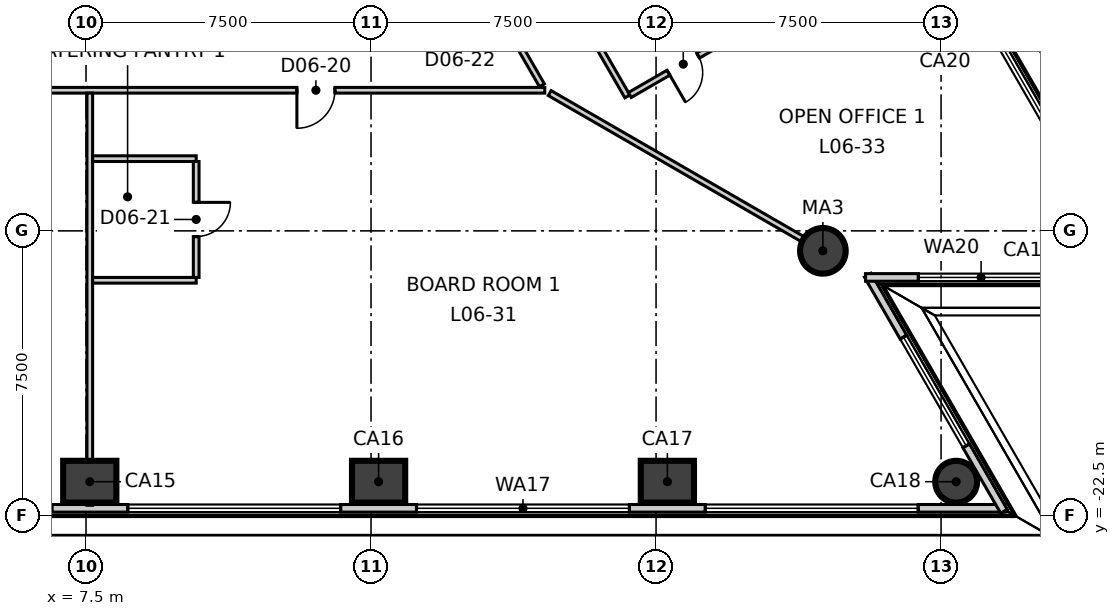
"""IFC4 building model, lengths in metres.
Left out: names, types, materials, properties, quantities, classifications, styles, units other than length and angle.
Written with IfcOpenShell. Run it as: python <this file> out.ifc"""

import sys

from ifc_helpers import new_model, si_unit, direction, frame, frame_2d, origin, origin_2d, place, context, subcontext, project, spatial, rectangle, circle, extrude, element, fill, save


model = new_model("IFC4")
c1 = context("Model", 3, precision=1e-05, world=origin(), true_north=direction((0.0, 1.0)))
c2 = subcontext(c1, "Body", "Model", "MODEL_VIEW")
j1 = project(units=[si_unit("LENGTHUNIT", "METRE"), si_unit("PLANEANGLEUNIT", "RADIAN")], contexts=[c1])
p1 = place(None, origin())
s1 = spatial("IfcSite", under=j1, at=p1, CompositionType="ELEMENT")
p2 = place(p1, origin())
s2 = spatial("IfcBuilding", under=s1, at=p2, CompositionType="ELEMENT")
p3 = place(p2, frame((0.0, 0.0, 35.3)))
s3 = spatial("IfcBuildingStorey", under=s2, at=p3, CompositionType="ELEMENT", Elevation=35.3)
for number, where, z_axis, x_axis in (
    (1, (7.599, -21.6, -0.3), (0.0, 0.0, 1.0), (1.0, 0.0, 0.0)),
    (2, (15.199, -21.6, -0.3), (0.0, 0.0, 1.0), (1.0, 0.0, 0.0)),
    (3, (22.798, -21.6, -0.3), (0.0, 0.0, 1.0), (1.0, 0.0, 0.0)),
):
    element("IfcColumn", number, at=place(p3, frame(where, z_axis=z_axis, x_axis=x_axis)), inside=s3, PredefinedType="COLUMN", context=c2, shape_type="SweptSolid", body=[
        extrude(rectangle(XDim=1.4, YDim=1.1, at=origin_2d()), origin(), (0.0, 0.0, 1.0), 4.0),
    ])
p4 = place(p3, frame((30.397, -21.6, -0.3), z_axis=(0.0, 0.0, 1.0), x_axis=(1.0, 0.0, 0.0)))
e4 = element("IfcColumn", 4, at=p4, inside=s3, PredefinedType="COLUMN", context=c2, shape_type="SweptSolid", body=[
    extrude(circle(Radius=0.55, at=origin_2d()), origin(), (0.0, 0.0, 1.0), 4.0),
])
p5 = place(p3, frame((26.89, -15.525, -0.3), z_axis=(0.0, 0.0, 1.0), x_axis=(1.0, 0.0, 0.0)))
e5 = element("IfcColumn", 5, at=p5, inside=s3, PredefinedType="COLUMN", context=c2, shape_type="SweptSolid", body=[
    extrude(circle(Radius=0.6, at=origin_2d()), origin(), (0.0, 0.0, 1.0), 4.0),
])
p6 = place(p3, frame((-31.7, -22.3, 0.0), z_axis=(0.0, 0.0, 1.0), x_axis=(1.0, 0.0, 0.0)))
e6 = element("IfcWall", 6, at=p6, inside=s3, PredefinedType="ELEMENTEDWALL", context=c2, shape_type="SweptSolid", body=[
    extrude(rectangle(XDim=63.38, YDim=0.2, at=frame_2d((31.69, 0.0))), origin(), (0.0, 0.0, 1.0), 3.7),
])
p7 = place(p6, frame((2.303, 0.0, 0.9)))
e7 = element("IfcOpeningElement", 7, at=p7, cuts=e6, PredefinedType="OPENING", context=c2, shape_type="SweptSolid", body=[
    extrude(rectangle(XDim=5.6, YDim=2.5, at=frame_2d((2.8, 1.25))), frame((0.0, 0.11, 0.0), z_axis=(0.0, -1.0, 0.0), x_axis=(1.0, 0.0, 0.0)), (0.0, 0.0, 1.0), 0.22),
])
p8 = place(p6, frame((9.902, 0.0, 0.9)))
e8 = element("IfcOpeningElement", 8, at=p8, cuts=e6, PredefinedType="OPENING", context=c2, shape_type="SweptSolid", body=[
    extrude(rectangle(XDim=5.6, YDim=2.5, at=frame_2d((2.8, 1.25))), frame((0.0, 0.11, 0.0), z_axis=(0.0, -1.0, 0.0), x_axis=(1.0, 0.0, 0.0)), (0.0, 0.0, 1.0), 0.22),
])
p9 = place(p6, frame((17.501, 0.0, 0.9)))
e9 = element("IfcOpeningElement", 9, at=p9, cuts=e6, PredefinedType="OPENING", context=c2, shape_type="SweptSolid", body=[
    extrude(rectangle(XDim=5.6, YDim=2.5, at=frame_2d((2.8, 1.25))), frame((0.0, 0.11, 0.0), z_axis=(0.0, -1.0, 0.0), x_axis=(1.0, 0.0, 0.0)), (0.0, 0.0, 1.0), 0.22),
])
p10 = place(p6, frame((25.1, 0.0, 0.9)))
e10 = element("IfcOpeningElement", 10, at=p10, cuts=e6, PredefinedType="OPENING", context=c2, shape_type="SweptSolid", body=[
    extrude(rectangle(XDim=5.6, YDim=2.5, at=frame_2d((2.8, 1.25))), frame((0.0, 0.11, 0.0), z_axis=(0.0, -1.0, 0.0), x_axis=(1.0, 0.0, 0.0)), (0.0, 0.0, 1.0), 0.22),
])
p11 = place(p6, frame((32.7, 0.0, 0.9)))
e11 = element("IfcOpeningElement", 11, at=p11, cuts=e6, PredefinedType="OPENING", context=c2, shape_type="SweptSolid", body=[
    extrude(rectangle(XDim=5.6, YDim=2.5, at=frame_2d((2.8, 1.25))), frame((0.0, 0.11, 0.0), z_axis=(0.0, -1.0, 0.0), x_axis=(1.0, 0.0, 0.0)), (0.0, 0.0, 1.0), 0.22),
])
p12 = place(p6, frame((40.299, 0.0, 0.9)))
e12 = element("IfcOpeningElement", 12, at=p12, cuts=e6, PredefinedType="OPENING", context=c2, shape_type="SweptSolid", body=[
    extrude(rectangle(XDim=5.6, YDim=2.5, at=frame_2d((2.8, 1.25))), frame((0.0, 0.11, 0.0), z_axis=(0.0, -1.0, 0.0), x_axis=(1.0, 0.0, 0.0)), (0.0, 0.0, 1.0), 0.22),
])
p13 = place(p6, frame((47.898, 0.0, 0.9)))
e13 = element("IfcOpeningElement", 13, at=p13, cuts=e6, PredefinedType="OPENING", context=c2, shape_type="SweptSolid", body=[
    extrude(rectangle(XDim=5.6, YDim=2.5, at=frame_2d((2.8, 1.25))), frame((0.0, 0.11, 0.0), z_axis=(0.0, -1.0, 0.0), x_axis=(1.0, 0.0, 0.0)), (0.0, 0.0, 1.0), 0.22),
])
p14 = place(p6, frame((55.497, 0.0, 0.9)))
e14 = element("IfcOpeningElement", 14, at=p14, cuts=e6, PredefinedType="OPENING", context=c2, shape_type="SweptSolid", body=[
    extrude(rectangle(XDim=5.6, YDim=2.5, at=frame_2d((2.8, 1.25))), frame((0.0, 0.11, 0.0), z_axis=(0.0, -1.0, 0.0), x_axis=(1.0, 0.0, 0.0)), (0.0, 0.0, 1.0), 0.22),
])
p15 = place(p3, frame((31.655, -22.378, 0.0), z_axis=(0.0, 0.0, 1.0), x_axis=(-0.499930606701, 0.866065464318, 0.0)))
e15 = element("IfcWall", 15, at=p15, inside=s3, PredefinedType="ELEMENTEDWALL", context=c2, shape_type="SweptSolid", body=[
    extrude(rectangle(XDim=7.175, YDim=0.2, at=frame_2d((3.587, 0.0))), origin(), (0.0, 0.0, 1.0), 3.7),
])
p16 = place(p15, frame((1.99, 0.0, 0.9)))
e16 = element("IfcOpeningElement", 16, at=p16, cuts=e15, PredefinedType="OPENING", context=c2, shape_type="SweptSolid", body=[
    extrude(rectangle(XDim=3.3, YDim=2.5, at=frame_2d((1.65, 1.25))), frame((0.0, 0.11, 0.0), z_axis=(0.0, -1.0, 0.0), x_axis=(1.0, 0.0, 0.0)), (0.0, 0.0, 1.0), 0.22),
])
p17 = place(p3, frame((28.013, -16.225, 0.0), z_axis=(0.0, 0.0, 1.0), x_axis=(1.0, 0.0, 0.0)))
e17 = element("IfcWall", 17, at=p17, inside=s3, PredefinedType="ELEMENTEDWALL", context=c2, shape_type="SweptSolid", body=[
    extrude(rectangle(XDim=7.175, YDim=0.2, at=frame_2d((3.587, 0.0))), origin(), (0.0, 0.0, 1.0), 3.7),
])
p18 = place(p17, frame((1.39, 0.0, 0.9)))
e18 = element("IfcOpeningElement", 18, at=p18, cuts=e17, PredefinedType="OPENING", context=c2, shape_type="SweptSolid", body=[
    extrude(rectangle(XDim=3.3, YDim=2.5, at=frame_2d((1.65, 1.25))), frame((0.0, 0.11, 0.0), z_axis=(0.0, -1.0, 0.0), x_axis=(1.0, 0.0, 0.0)), (0.0, 0.0, 1.0), 0.22),
])
p19 = place(p3, frame((35.163, -16.303, 0.0), z_axis=(0.0, 0.0, 1.0), x_axis=(-0.500012207976, 0.866018355391, 0.0)))
e19 = element("IfcWall", 19, at=p19, inside=s3, PredefinedType="ELEMENTEDWALL", context=c2, shape_type="SweptSolid", body=[
    extrude(rectangle(XDim=63.381, YDim=0.2, at=frame_2d((31.69, 0.0))), origin(), (0.0, 0.0, 1.0), 3.7),
])
p20 = place(p19, frame((2.302, 0.0, 0.9)))
e20 = element("IfcOpeningElement", 20, at=p20, cuts=e19, PredefinedType="OPENING", context=c2, shape_type="SweptSolid", body=[
    extrude(rectangle(XDim=5.6, YDim=2.5, at=frame_2d((2.8, 1.25))), frame((0.0, 0.11, 0.0), z_axis=(0.0, -1.0, 0.0), x_axis=(1.0, 0.0, 0.0)), (0.0, 0.0, 1.0), 0.22),
])
p21 = place(p19, frame((9.902, 0.0, 0.9)))
e21 = element("IfcOpeningElement", 21, at=p21, cuts=e19, PredefinedType="OPENING", context=c2, shape_type="SweptSolid", body=[
    extrude(rectangle(XDim=5.6, YDim=2.5, at=frame_2d((2.8, 1.25))), frame((0.0, 0.11, 0.0), z_axis=(0.0, -1.0, 0.0), x_axis=(1.0, 0.0, 0.0)), (0.0, 0.0, 1.0), 0.22),
])
p22 = place(p19, frame((17.501, 0.0, 0.9)))
e22 = element("IfcOpeningElement", 22, at=p22, cuts=e19, PredefinedType="OPENING", context=c2, shape_type="SweptSolid", body=[
    extrude(rectangle(XDim=5.6, YDim=2.5, at=frame_2d((2.8, 1.25))), frame((0.0, 0.11, 0.0), z_axis=(0.0, -1.0, 0.0), x_axis=(1.0, 0.0, 0.0)), (0.0, 0.0, 1.0), 0.22),
])
p23 = place(p19, frame((25.101, 0.0, 0.9)))
e23 = element("IfcOpeningElement", 23, at=p23, cuts=e19, PredefinedType="OPENING", context=c2, shape_type="SweptSolid", body=[
    extrude(rectangle(XDim=5.6, YDim=2.5, at=frame_2d((2.8, 1.25))), frame((0.0, 0.11, 0.0), z_axis=(0.0, -1.0, 0.0), x_axis=(1.0, 0.0, 0.0)), (0.0, 0.0, 1.0), 0.22),
])
p24 = place(p19, frame((32.7, 0.0, 0.9)))
e24 = element("IfcOpeningElement", 24, at=p24, cuts=e19, PredefinedType="OPENING", context=c2, shape_type="SweptSolid", body=[
    extrude(rectangle(XDim=5.6, YDim=2.5, at=frame_2d((2.8, 1.25))), frame((0.0, 0.11, 0.0), z_axis=(0.0, -1.0, 0.0), x_axis=(1.0, 0.0, 0.0)), (0.0, 0.0, 1.0), 0.22),
])
p25 = place(p19, frame((40.299, 0.0, 0.9)))
e25 = element("IfcOpeningElement", 25, at=p25, cuts=e19, PredefinedType="OPENING", context=c2, shape_type="SweptSolid", body=[
    extrude(rectangle(XDim=5.6, YDim=2.5, at=frame_2d((2.8, 1.25))), frame((0.0, 0.11, 0.0), z_axis=(0.0, -1.0, 0.0), x_axis=(1.0, 0.0, 0.0)), (0.0, 0.0, 1.0), 0.22),
])
p26 = place(p19, frame((47.899, 0.0, 0.9)))
e26 = element("IfcOpeningElement", 26, at=p26, cuts=e19, PredefinedType="OPENING", context=c2, shape_type="SweptSolid", body=[
    extrude(rectangle(XDim=5.6, YDim=2.5, at=frame_2d((2.8, 1.25))), frame((0.0, 0.11, 0.0), z_axis=(0.0, -1.0, 0.0), x_axis=(1.0, 0.0, 0.0)), (0.0, 0.0, 1.0), 0.22),
])
p27 = place(p19, frame((55.498, 0.0, 0.9)))
e27 = element("IfcOpeningElement", 27, at=p27, cuts=e19, PredefinedType="OPENING", context=c2, shape_type="SweptSolid", body=[
    extrude(rectangle(XDim=5.6, YDim=2.5, at=frame_2d((2.8, 1.25))), frame((0.0, 0.11, 0.0), z_axis=(0.0, -1.0, 0.0), x_axis=(1.0, 0.0, 0.0)), (0.0, 0.0, 1.0), 0.22),
])
p28 = place(p3, frame((-19.422, -11.3, 0.0), z_axis=(0.0, 0.0, 1.0), x_axis=(1.0, 0.0, 0.0)))
e28 = element("IfcWall", 28, at=p28, inside=s3, PredefinedType="PARTITIONING", context=c2, shape_type="SweptSolid", body=[
    extrude(rectangle(XDim=38.994, YDim=0.15, at=frame_2d((19.497, 0.0))), origin(), (0.0, 0.0, 1.0), 3.7),
])
p29 = place(p28, frame((1.5, 0.0, 0.0)))
e29 = element("IfcOpeningElement", 29, at=p29, cuts=e28, PredefinedType="OPENING", context=c2, shape_type="SweptSolid", body=[
    extrude(rectangle(XDim=1.1, YDim=2.1, at=frame_2d((0.55, 1.05))), frame((0.0, 0.085, 0.0), z_axis=(0.0, -1.0, 0.0), x_axis=(1.0, 0.0, 0.0)), (0.0, 0.0, 1.0), 0.17),
])
p30 = place(p28, frame((8.674, 0.0, 0.0)))
e30 = element("IfcOpeningElement", 30, at=p30, cuts=e28, PredefinedType="OPENING", context=c2, shape_type="SweptSolid", body=[
    extrude(rectangle(XDim=1.0, YDim=2.1, at=frame_2d((0.5, 1.05))), frame((0.0, 0.085, 0.0), z_axis=(0.0, -1.0, 0.0), x_axis=(1.0, 0.0, 0.0)), (0.0, 0.0, 1.0), 0.17),
])
p31 = place(p28, frame((4.974, 0.0, 0.0)))
e31 = element("IfcOpeningElement", 31, at=p31, cuts=e28, PredefinedType="OPENING", context=c2, shape_type="SweptSolid", body=[
    extrude(rectangle(XDim=0.9, YDim=2.1, at=frame_2d((0.45, 1.05))), frame((0.0, 0.085, 0.0), z_axis=(0.0, -1.0, 0.0), x_axis=(1.0, 0.0, 0.0)), (0.0, 0.0, 1.0), 0.17),
])
p32 = place(p28, frame((23.273, 0.0, 0.0)))
e32 = element("IfcOpeningElement", 32, at=p32, cuts=e28, PredefinedType="OPENING", context=c2, shape_type="SweptSolid", body=[
    extrude(rectangle(XDim=1.1, YDim=2.1, at=frame_2d((0.55, 1.05))), frame((0.0, 0.085, 0.0), z_axis=(0.0, -1.0, 0.0), x_axis=(1.0, 0.0, 0.0)), (0.0, 0.0, 1.0), 0.17),
])
p33 = place(p28, frame((12.973, 0.0, 0.0)))
e33 = element("IfcOpeningElement", 33, at=p33, cuts=e28, PredefinedType="OPENING", context=c2, shape_type="SweptSolid", body=[
    extrude(rectangle(XDim=0.9, YDim=2.1, at=frame_2d((0.45, 1.05))), frame((0.0, 0.085, 0.0), z_axis=(0.0, -1.0, 0.0), x_axis=(1.0, 0.0, 0.0)), (0.0, 0.0, 1.0), 0.17),
])
p34 = place(p28, frame((16.173, 0.0, 0.0)))
e34 = element("IfcOpeningElement", 34, at=p34, cuts=e28, PredefinedType="OPENING", context=c2, shape_type="SweptSolid", body=[
    extrude(rectangle(XDim=0.9, YDim=2.1, at=frame_2d((0.45, 1.05))), frame((0.0, 0.085, 0.0), z_axis=(0.0, -1.0, 0.0), x_axis=(1.0, 0.0, 0.0)), (0.0, 0.0, 1.0), 0.17),
])
p35 = place(p28, frame((18.873, 0.0, 0.0)))
e35 = element("IfcOpeningElement", 35, at=p35, cuts=e28, PredefinedType="OPENING", context=c2, shape_type="SweptSolid", body=[
    extrude(rectangle(XDim=1.0, YDim=2.1, at=frame_2d((0.5, 1.05))), frame((0.0, 0.085, 0.0), z_axis=(0.0, -1.0, 0.0), x_axis=(1.0, 0.0, 0.0)), (0.0, 0.0, 1.0), 0.17),
])
p36 = place(p28, frame((32.471, 0.0, 0.0)))
e36 = element("IfcOpeningElement", 36, at=p36, cuts=e28, PredefinedType="OPENING", context=c2, shape_type="SweptSolid", body=[
    extrude(rectangle(XDim=1.0, YDim=2.1, at=frame_2d((0.5, 1.05))), frame((0.0, 0.085, 0.0), z_axis=(0.0, -1.0, 0.0), x_axis=(1.0, 0.0, 0.0)), (0.0, 0.0, 1.0), 0.17),
])
p37 = place(p3, frame((19.702, -11.375, 0.0), z_axis=(0.0, 0.0, 1.0), x_axis=(0.866031533484, -0.499989382899, 0.0)))
e37 = element("IfcWall", 37, at=p37, inside=s3, PredefinedType="PARTITIONING", context=c2, shape_type="SweptSolid", body=[
    extrude(rectangle(XDim=8.92, YDim=0.15, at=frame_2d((4.46, 0.0))), origin(), (0.0, 0.0, 1.0), 3.05),
])
p38 = place(p3, frame((0.075, 22.47, 0.0), z_axis=(0.0, 0.0, 1.0), x_axis=(0.500002280369, -0.866024087209, 0.0)))
e38 = element("IfcWall", 38, at=p38, inside=s3, PredefinedType="PARTITIONING", context=c2, shape_type="SweptSolid", body=[
    extrude(rectangle(XDim=38.844, YDim=0.15, at=frame_2d((19.422, 0.0))), origin(), (0.0, 0.0, 1.0), 3.7),
])
p39 = place(p38, frame((36.244, 0.0, 0.0)))
e39 = element("IfcOpeningElement", 39, at=p39, cuts=e38, PredefinedType="OPENING", context=c2, shape_type="SweptSolid", body=[
    extrude(rectangle(XDim=1.1, YDim=2.1, at=frame_2d((0.55, 1.05))), frame((0.0, 0.085, 0.0), z_axis=(0.0, -1.0, 0.0), x_axis=(1.0, 0.0, 0.0)), (0.0, 0.0, 1.0), 0.17),
])
p40 = place(p38, frame((26.472, 0.0, 0.0)))
e40 = element("IfcOpeningElement", 40, at=p40, cuts=e38, PredefinedType="OPENING", context=c2, shape_type="SweptSolid", body=[
    extrude(rectangle(XDim=1.1, YDim=2.1, at=frame_2d((0.55, 1.05))), frame((0.0, 0.085, 0.0), z_axis=(0.0, -1.0, 0.0), x_axis=(1.0, 0.0, 0.0)), (0.0, 0.0, 1.0), 0.17),
])
p41 = place(p38, frame((8.872, 0.0, 0.0)))
e41 = element("IfcOpeningElement", 41, at=p41, cuts=e38, PredefinedType="OPENING", context=c2, shape_type="SweptSolid", body=[
    extrude(rectangle(XDim=1.1, YDim=2.1, at=frame_2d((0.55, 1.05))), frame((0.0, 0.085, 0.0), z_axis=(0.0, -1.0, 0.0), x_axis=(1.0, 0.0, 0.0)), (0.0, 0.0, 1.0), 0.17),
])
p42 = place(p38, frame((17.672, 0.0, 0.0)))
e42 = element("IfcOpeningElement", 42, at=p42, cuts=e38, PredefinedType="OPENING", context=c2, shape_type="SweptSolid", body=[
    extrude(rectangle(XDim=0.9, YDim=2.1, at=frame_2d((0.45, 1.05))), frame((0.0, 0.085, 0.0), z_axis=(0.0, -1.0, 0.0), x_axis=(1.0, 0.0, 0.0)), (0.0, 0.0, 1.0), 0.17),
])
p43 = place(p38, frame((15.272, 0.0, 0.0)))
e43 = element("IfcOpeningElement", 43, at=p43, cuts=e38, PredefinedType="OPENING", context=c2, shape_type="SweptSolid", body=[
    extrude(rectangle(XDim=0.9, YDim=2.1, at=frame_2d((0.45, 1.05))), frame((0.0, 0.085, 0.0), z_axis=(0.0, -1.0, 0.0), x_axis=(1.0, 0.0, 0.0)), (0.0, 0.0, 1.0), 0.17),
])
p44 = place(p38, frame((1.473, 0.0, 0.0)))
e44 = element("IfcOpeningElement", 44, at=p44, cuts=e38, PredefinedType="OPENING", context=c2, shape_type="SweptSolid", body=[
    extrude(rectangle(XDim=1.1, YDim=2.1, at=frame_2d((0.55, 1.05))), frame((0.0, 0.085, 0.0), z_axis=(0.0, -1.0, 0.0), x_axis=(1.0, 0.0, 0.0)), (0.0, 0.0, 1.0), 0.17),
])
p45 = place(p3, frame((7.599, -22.22, 0.0), z_axis=(0.0, 0.0, 1.0), x_axis=(0.0, 1.0, 0.0)))
e45 = element("IfcWall", 45, at=p45, inside=s3, PredefinedType="PARTITIONING", context=c2, shape_type="SweptSolid", body=[
    extrude(rectangle(XDim=10.845, YDim=0.15, at=frame_2d((5.422, 0.0))), origin(), (0.0, 0.0, 1.0), 3.7),
])
for number, where, z_axis, x_axis in (
    (46, (7.674, -13.1, 0.0), (0.0, 0.0, 1.0), (1.0, 0.0, 0.0)),
    (47, (7.674, -16.3, 0.0), (0.0, 0.0, 1.0), (1.0, 0.0, 0.0)),
):
    element("IfcWall", number, at=place(p3, frame(where, z_axis=z_axis, x_axis=x_axis)), inside=s3, PredefinedType="PARTITIONING", context=c2, shape_type="SweptSolid", body=[
        extrude(rectangle(XDim=2.725, YDim=0.15, at=frame_2d((1.362, 0.0))), origin(), (0.0, 0.0, 1.0), 3.7),
    ])
p46 = place(p3, frame((10.399, -16.225, 0.0), z_axis=(0.0, 0.0, 1.0), x_axis=(0.0, 1.0, 0.0)))
e48 = element("IfcWall", 48, at=p46, inside=s3, PredefinedType="PARTITIONING", context=c2, shape_type="SweptSolid", body=[
    extrude(rectangle(XDim=3.05, YDim=0.15, at=frame_2d((1.525, 0.0))), origin(), (0.0, 0.0, 1.0), 3.7),
])
p47 = place(p46, frame((1.075, 0.0, 0.0)))
e49 = element("IfcOpeningElement", 49, at=p47, cuts=e48, PredefinedType="OPENING", context=c2, shape_type="SweptSolid", body=[
    extrude(rectangle(XDim=0.9, YDim=2.1, at=frame_2d((0.45, 1.05))), frame((0.0, 0.085, 0.0), z_axis=(0.0, -1.0, 0.0), x_axis=(1.0, 0.0, 0.0)), (0.0, 0.0, 1.0), 0.17),
])
p48 = place(p3, frame((18.982, -6.678, 0.0), z_axis=(0.0, 0.0, 1.0), x_axis=(0.500083244257, -0.865977337356, 0.0)))
e50 = element("IfcWall", 50, at=p48, inside=s3, PredefinedType="PARTITIONING", context=c2, shape_type="SweptSolid", body=[
    extrude(rectangle(XDim=5.525, YDim=0.15, at=frame_2d((2.763, 0.0))), origin(), (0.0, 0.0, 1.0), 3.7),
])
p49 = place(p48, frame((0.875, 0.0, 0.0)))
e51 = element("IfcOpeningElement", 51, at=p49, cuts=e50, PredefinedType="OPENING", context=c2, shape_type="SweptSolid", body=[
    extrude(rectangle(XDim=0.9, YDim=2.1, at=frame_2d((0.45, 1.05))), frame((0.0, 0.085, 0.0), z_axis=(0.0, -1.0, 0.0), x_axis=(1.0, 0.0, 0.0)), (0.0, 0.0, 1.0), 0.17),
])
p50 = place(p3, frame((21.81, -11.425, 0.0), z_axis=(0.0, 0.0, 1.0), x_axis=(0.865977875238, 0.500082312822, 0.0)))
e52 = element("IfcWall", 52, at=p50, inside=s3, PredefinedType="PARTITIONING", context=c2, shape_type="SweptSolid", body=[
    extrude(rectangle(XDim=3.25, YDim=0.15, at=frame_2d((1.625, 0.0))), origin(), (0.0, 0.0, 1.0), 3.7),
])
p51 = place(p50, frame((1.174, 0.0, 0.0)))
e53 = element("IfcOpeningElement", 53, at=p51, cuts=e52, PredefinedType="OPENING", context=c2, shape_type="SweptSolid", body=[
    extrude(rectangle(XDim=0.9, YDim=2.1, at=frame_2d((0.45, 1.05))), frame((0.0, 0.085, 0.0), z_axis=(0.0, -1.0, 0.0), x_axis=(1.0, 0.0, 0.0)), (0.0, 0.0, 1.0), 0.17),
])
p52 = place(p11, origin())
e54 = element("IfcWindow", 54, at=p52, inside=s3, PartitioningType="SINGLE_PANEL", PredefinedType="WINDOW", context=c2, shape_type="SweptSolid", body=[
    extrude(rectangle(XDim=5.6, YDim=2.5, at=frame_2d((2.8, 1.25))), frame((0.0, 0.03, 0.0), z_axis=(0.0, -1.0, 0.0), x_axis=(1.0, 0.0, 0.0)), (0.0, 0.0, 1.0), 0.06),
])
fill(e11, e54)
p53 = place(p12, origin())
e55 = element("IfcWindow", 55, at=p53, inside=s3, PartitioningType="SINGLE_PANEL", PredefinedType="WINDOW", context=c2, shape_type="SweptSolid", body=[
    extrude(rectangle(XDim=5.6, YDim=2.5, at=frame_2d((2.8, 1.25))), frame((0.0, 0.03, 0.0), z_axis=(0.0, -1.0, 0.0), x_axis=(1.0, 0.0, 0.0)), (0.0, 0.0, 1.0), 0.06),
])
fill(e12, e55)
p54 = place(p13, origin())
e56 = element("IfcWindow", 56, at=p54, inside=s3, PartitioningType="SINGLE_PANEL", PredefinedType="WINDOW", context=c2, shape_type="SweptSolid", body=[
    extrude(rectangle(XDim=5.6, YDim=2.5, at=frame_2d((2.8, 1.25))), frame((0.0, 0.03, 0.0), z_axis=(0.0, -1.0, 0.0), x_axis=(1.0, 0.0, 0.0)), (0.0, 0.0, 1.0), 0.06),
])
fill(e13, e56)
p55 = place(p14, origin())
e57 = element("IfcWindow", 57, at=p55, inside=s3, PartitioningType="SINGLE_PANEL", PredefinedType="WINDOW", context=c2, shape_type="SweptSolid", body=[
    extrude(rectangle(XDim=5.6, YDim=2.5, at=frame_2d((2.8, 1.25))), frame((0.0, 0.03, 0.0), z_axis=(0.0, -1.0, 0.0), x_axis=(1.0, 0.0, 0.0)), (0.0, 0.0, 1.0), 0.06),
])
fill(e14, e57)
p56 = place(p16, origin())
e58 = element("IfcWindow", 58, at=p56, inside=s3, PartitioningType="SINGLE_PANEL", PredefinedType="WINDOW", context=c2, shape_type="SweptSolid", body=[
    extrude(rectangle(XDim=3.3, YDim=2.5, at=frame_2d((1.65, 1.25))), frame((0.0, 0.03, 0.0), z_axis=(0.0, -1.0, 0.0), x_axis=(1.0, 0.0, 0.0)), (0.0, 0.0, 1.0), 0.06),
])
fill(e16, e58)
p57 = place(p18, origin())
e59 = element("IfcWindow", 59, at=p57, inside=s3, PartitioningType="SINGLE_PANEL", PredefinedType="WINDOW", context=c2, shape_type="SweptSolid", body=[
    extrude(rectangle(XDim=3.3, YDim=2.5, at=frame_2d((1.65, 1.25))), frame((0.0, 0.03, 0.0), z_axis=(0.0, -1.0, 0.0), x_axis=(1.0, 0.0, 0.0)), (0.0, 0.0, 1.0), 0.06),
])
fill(e18, e59)
p58 = place(p20, origin())
e60 = element("IfcWindow", 60, at=p58, inside=s3, PartitioningType="SINGLE_PANEL", PredefinedType="WINDOW", context=c2, shape_type="SweptSolid", body=[
    extrude(rectangle(XDim=5.6, YDim=2.5, at=frame_2d((2.8, 1.25))), frame((0.0, 0.03, 0.0), z_axis=(0.0, -1.0, 0.0), x_axis=(1.0, 0.0, 0.0)), (0.0, 0.0, 1.0), 0.06),
])
fill(e20, e60)
p59 = place(p36, origin())
e61 = element("IfcDoor", 61, at=p59, inside=s3, OperationType="SINGLE_SWING_LEFT", PredefinedType="DOOR", context=c2, shape_type="SweptSolid", body=[
    extrude(rectangle(XDim=1.0, YDim=2.1, at=frame_2d((0.5, 1.05))), frame((0.0, 0.025, 0.0), z_axis=(0.0, -1.0, 0.0), x_axis=(1.0, 0.0, 0.0)), (0.0, 0.0, 1.0), 0.05),
])
fill(e36, e61)
p60 = place(p47, origin())
e62 = element("IfcDoor", 62, at=p60, inside=s3, OperationType="SINGLE_SWING_RIGHT", PredefinedType="DOOR", context=c2, shape_type="SweptSolid", body=[
    extrude(rectangle(XDim=0.9, YDim=2.1, at=frame_2d((0.45, 1.05))), frame((0.0, 0.025, 0.0), z_axis=(0.0, -1.0, 0.0), x_axis=(1.0, 0.0, 0.0)), (0.0, 0.0, 1.0), 0.05),
])
fill(e49, e62)
p61 = place(p51, origin())
e63 = element("IfcDoor", 63, at=p61, inside=s3, OperationType="SINGLE_SWING_LEFT", PredefinedType="DOOR", context=c2, shape_type="SweptSolid", body=[
    extrude(rectangle(XDim=0.9, YDim=2.1, at=frame_2d((0.45, 1.05))), frame((0.0, 0.025, 0.0), z_axis=(0.0, -1.0, 0.0), x_axis=(1.0, 0.0, 0.0)), (0.0, 0.0, 1.0), 0.05),
])
fill(e53, e63)
save(model, sys.argv[1])
